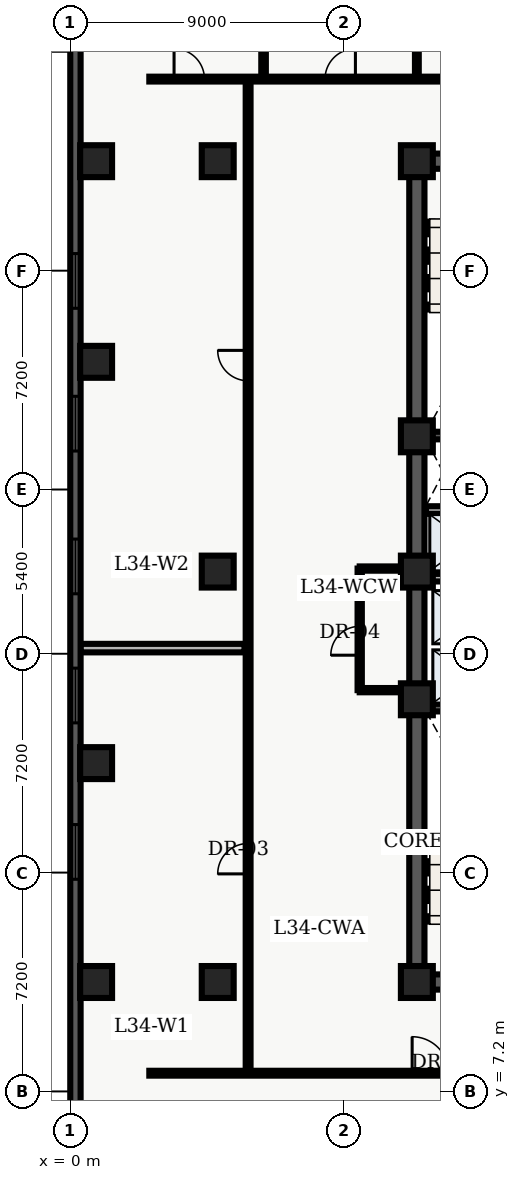
"""IFC4 building model, lengths in metres.
Left out: names, types, materials, properties, quantities, classifications, styles, units other than length and angle.
Written with IfcOpenShell. Run it as: python <this file> out.ifc"""

import sys

from ifc_helpers import new_model, entity, si_unit, converted_unit, direction, frame, origin_with_axes, origin_2d_with_axis, place, context, subcontext, project, spatial, polyline, rectangle, outline, extrude, element, fill, save


model = new_model("IFC4")
c1 = context("Model", 3, precision=1e-05, world=origin_with_axes(), true_north=direction((0.0, 1.0)))
c2 = subcontext(c1, "Body", "Model", "MODEL_VIEW")
j1 = project(units=[si_unit("LENGTHUNIT", "METRE"), converted_unit("PLANEANGLEUNIT", "DEGREE", entity("IfcPlaneAngleMeasure", 0.017), si_unit("PLANEANGLEUNIT", "RADIAN"), dimensions=[0, 0, 0, 0, 0, 0, 0])], contexts=[c1])
p1 = place(None, origin_with_axes())
s1 = spatial("IfcSite", under=j1, at=p1, CompositionType="ELEMENT")
p2 = place(p1, origin_with_axes())
s2 = spatial("IfcBuilding", under=s1, at=p2, CompositionType="ELEMENT")
p3 = place(p2, frame((0.0, 0.0, 140.7), z_axis=(0.0, 0.0, 1.0), x_axis=(1.0, 0.0, 0.0)))
s3 = spatial("IfcBuildingStorey", under=s2, at=p3, CompositionType="ELEMENT", Elevation=140.7)
p4 = place(p3, frame((11.4, 10.8, 0.0), z_axis=(0.0, 0.0, 1.0), x_axis=(0.0, 1.0, 0.0)))
e1 = element("IfcWall", 1, at=p4, inside=s3, PredefinedType="SHEAR", context=c2, shape_type="SweptSolid", body=[
    extrude(outline(polyline([(0.0, -0.25), (27.0, -0.25), (27.0, 0.25), (0.0, 0.25), (0.0, -0.25)])), origin_with_axes(), (0.0, 0.0, 1.0), 3.66),
])
p5 = place(p3, frame((11.4, 10.8, 0.0), z_axis=(0.0, 0.0, 1.0), x_axis=(1.0, 0.0, 0.0)))
e2 = element("IfcWall", 2, at=p5, inside=s3, PredefinedType="SHEAR", context=c2, shape_type="SweptSolid", body=[
    extrude(outline(polyline([(0.0, -0.25), (7.2, -0.25), (7.2, 0.25), (0.0, 0.25), (0.0, -0.25)])), origin_with_axes(), (0.0, 0.0, 1.0), 3.66),
])
p6 = place(p5, frame((2.625, 0.0, 0.0), z_axis=(0.0, 0.0, 1.0), x_axis=(1.0, 0.0, 0.0)))
e3 = element("IfcOpeningElement", 3, at=p6, cuts=e2, PredefinedType="OPENING", context=c2, shape_type="SweptSolid", body=[
    extrude(rectangle(XDim=1.05, YDim=0.52, at=origin_2d_with_axis()), origin_with_axes(), (0.0, 0.0, 1.0), 2.15),
])
p7 = place(p3, frame((11.4, 37.8, 0.0), z_axis=(0.0, 0.0, 1.0), x_axis=(1.0, 0.0, 0.0)))
e4 = element("IfcWall", 4, at=p7, inside=s3, PredefinedType="SHEAR", context=c2, shape_type="SweptSolid", body=[
    extrude(outline(polyline([(0.0, -0.25), (7.2, -0.25), (7.2, 0.25), (0.0, 0.25), (0.0, -0.25)])), origin_with_axes(), (0.0, 0.0, 1.0), 3.66),
])
p8 = place(p7, frame((2.625, 0.0, 0.0), z_axis=(0.0, 0.0, 1.0), x_axis=(1.0, 0.0, 0.0)))
e5 = element("IfcOpeningElement", 5, at=p8, cuts=e4, PredefinedType="OPENING", context=c2, shape_type="SweptSolid", body=[
    extrude(rectangle(XDim=1.05, YDim=0.52, at=origin_2d_with_axis()), origin_with_axes(), (0.0, 0.0, 1.0), 2.15),
])
for number, where, z_axis, x_axis in (
    (6, (11.65, 19.825, 0.0), (0.0, 0.0, 1.0), (1.0, 0.0, 0.0)),
    (7, (11.65, 28.775, 0.0), (0.0, 0.0, 1.0), (1.0, 0.0, 0.0)),
):
    element("IfcWall", number, at=place(p3, frame(where, z_axis=z_axis, x_axis=x_axis)), inside=s3, PredefinedType="SHEAR", context=c2, shape_type="SweptSolid", body=[
        extrude(outline(polyline([(0.0, -0.125), (6.7, -0.125), (6.7, 0.125), (0.0, 0.125), (0.0, -0.125)])), origin_with_axes(), (0.0, 0.0, 1.0), 3.66),
    ])
p9 = place(p3, frame((11.7, 24.1, 0.0), z_axis=(0.0, 0.0, 1.0), x_axis=(1.0, 0.0, 0.0)))
e8 = element("IfcWall", 8, at=p9, inside=s3, PredefinedType="SOLIDWALL", context=c2, shape_type="SweptSolid", body=[
    extrude(outline(polyline([(0.0, -0.125), (6.6, -0.125), (6.6, 0.125), (0.0, 0.125), (0.0, -0.125)])), origin_with_axes(), (0.0, 0.0, 1.0), 2.7),
])
p10 = place(p9, frame((3.6, 0.0, 0.0), z_axis=(0.0, 0.0, 1.0), x_axis=(1.0, 0.0, 0.0)))
e9 = element("IfcOpeningElement", 9, at=p10, cuts=e8, PredefinedType="OPENING", context=c2, shape_type="SweptSolid", body=[
    extrude(rectangle(XDim=0.9, YDim=0.27, at=origin_2d_with_axis()), origin_with_axes(), (0.0, 0.0, 1.0), 2.15),
])
p11 = place(p9, frame((5.65, 0.0, 0.0), z_axis=(0.0, 0.0, 1.0), x_axis=(1.0, 0.0, 0.0)))
e10 = element("IfcOpeningElement", 10, at=p11, cuts=e8, PredefinedType="OPENING", context=c2, shape_type="SweptSolid", body=[
    extrude(rectangle(XDim=0.9, YDim=0.27, at=origin_2d_with_axis()), origin_with_axes(), (0.0, 0.0, 1.0), 2.15),
])
p12 = place(p3, frame((11.7, 26.325, 0.0), z_axis=(0.0, 0.0, 1.0), x_axis=(1.0, 0.0, 0.0)))
e11 = element("IfcWall", 11, at=p12, inside=s3, PredefinedType="SOLIDWALL", context=c2, shape_type="SweptSolid", body=[
    extrude(outline(polyline([(0.0, -0.125), (6.6, -0.125), (6.6, 0.125), (0.0, 0.125), (0.0, -0.125)])), origin_with_axes(), (0.0, 0.0, 1.0), 2.7),
])
p13 = place(p12, frame((3.5, 0.0, 0.0), z_axis=(0.0, 0.0, 1.0), x_axis=(1.0, 0.0, 0.0)))
e12 = element("IfcOpeningElement", 12, at=p13, cuts=e11, PredefinedType="OPENING", context=c2, shape_type="SweptSolid", body=[
    extrude(rectangle(XDim=0.9, YDim=0.27, at=origin_2d_with_axis()), origin_with_axes(), (0.0, 0.0, 1.0), 2.15),
])
for number, where, z_axis, x_axis in (
    (13, (11.4, 10.8, 0.0), (0.0, 0.0, 1.0), (1.0, 0.0, 0.0)),
    (14, (11.4, 20.1, 0.0), (0.0, 0.0, 1.0), (1.0, 0.0, 0.0)),
    (15, (11.4, 24.3, 0.0), (0.0, 0.0, 1.0), (1.0, 0.0, 0.0)),
    (16, (11.4, 28.75, 0.0), (0.0, 0.0, 1.0), (1.0, 0.0, 0.0)),
    (17, (11.4, 37.8, 0.0), (0.0, 0.0, 1.0), (1.0, 0.0, 0.0)),
    (18, (4.85, 10.8, 0.0), (0.0, 0.0, 1.0), (1.0, 0.0, 0.0)),
    (19, (4.85, 24.3, 0.0), (0.0, 0.0, 1.0), (1.0, 0.0, 0.0)),
    (20, (4.85, 37.8, 0.0), (0.0, 0.0, 1.0), (1.0, 0.0, 0.0)),
    (21, (0.85, 10.8, 0.0), (0.0, 0.0, 1.0), (1.0, 0.0, 0.0)),
    (22, (0.85, 18.0, 0.0), (0.0, 0.0, 1.0), (1.0, 0.0, 0.0)),
    (23, (0.85, 31.2, 0.0), (0.0, 0.0, 1.0), (1.0, 0.0, 0.0)),
    (24, (0.85, 37.8, 0.0), (0.0, 0.0, 1.0), (1.0, 0.0, 0.0)),
):
    element("IfcColumn", number, at=place(p3, frame(where, z_axis=z_axis, x_axis=x_axis)), inside=s3, PredefinedType="COLUMN", context=c2, shape_type="SweptSolid", body=[
        extrude(rectangle(XDim=1.05, YDim=1.05, at=origin_2d_with_axis()), origin_with_axes(), (0.0, 0.0, 1.0), 3.9),
    ])
p14 = place(p3, frame((9.52, 20.4, 0.0), z_axis=(0.0, 0.0, 1.0), x_axis=(0.0, 1.0, 0.0)))
e25 = element("IfcWall", 25, at=p14, inside=s3, PredefinedType="PARTITIONING", context=c2, shape_type="SweptSolid", body=[
    extrude(outline(polyline([(0.0, -0.07), (4.0, -0.07), (4.0, 0.07), (0.0, 0.07), (0.0, -0.07)])), origin_with_axes(), (0.0, 0.0, 1.0), 2.7),
])
p15 = place(p14, frame((1.625, 0.0, 0.0), z_axis=(0.0, 0.0, 1.0), x_axis=(1.0, 0.0, 0.0)))
e26 = element("IfcOpeningElement", 26, at=p15, cuts=e25, PredefinedType="OPENING", context=c2, shape_type="SweptSolid", body=[
    extrude(rectangle(XDim=0.95, YDim=0.16, at=origin_2d_with_axis()), origin_with_axes(), (0.0, 0.0, 1.0), 2.15),
])
for number, where, z_axis, x_axis in (
    (27, (9.52, 20.4, 0.0), (0.0, 0.0, 1.0), (1.0, 0.0, 0.0)),
    (28, (9.52, 24.4, 0.0), (0.0, 0.0, 1.0), (1.0, 0.0, 0.0)),
):
    element("IfcWall", number, at=place(p3, frame(where, z_axis=z_axis, x_axis=x_axis)), inside=s3, PredefinedType="PARTITIONING", context=c2, shape_type="SweptSolid", body=[
        extrude(outline(polyline([(0.0, -0.07), (1.58, -0.07), (1.58, 0.07), (0.0, 0.07), (0.0, -0.07)])), origin_with_axes(), (0.0, 0.0, 1.0), 2.7),
    ])
p16 = place(p3, frame((2.6, 7.8, 0.0), z_axis=(0.0, 0.0, 1.0), x_axis=(1.0, 0.0, 0.0)))
e29 = element("IfcWall", 29, at=p16, inside=s3, PredefinedType="PARTITIONING", context=c2, shape_type="SweptSolid", body=[
    extrude(outline(polyline([(0.0, -0.08), (18.55, -0.08), (18.55, 0.08), (0.0, 0.08), (0.0, -0.08)])), origin_with_axes(), (0.0, 0.0, 1.0), 2.7),
])
p17 = place(p16, frame((9.245, 0.0, 0.0), z_axis=(0.0, 0.0, 1.0), x_axis=(1.0, 0.0, 0.0)))
e30 = element("IfcOpeningElement", 30, at=p17, cuts=e29, PredefinedType="OPENING", context=c2, shape_type="SweptSolid", body=[
    extrude(rectangle(XDim=1.2, YDim=0.18, at=origin_2d_with_axis()), origin_with_axes(), (0.0, 0.0, 1.0), 2.2),
])
p18 = place(p3, frame((2.6, 40.5, 0.0), z_axis=(0.0, 0.0, 1.0), x_axis=(1.0, 0.0, 0.0)))
e31 = element("IfcWall", 31, at=p18, inside=s3, PredefinedType="PARTITIONING", context=c2, shape_type="SweptSolid", body=[
    extrude(outline(polyline([(0.0, -0.08), (19.054, -0.08), (19.054, 0.08), (0.0, 0.08), (0.0, -0.08)])), origin_with_axes(), (0.0, 0.0, 1.0), 2.7),
])
p19 = place(p18, frame((1.314, 0.0, 0.0), z_axis=(0.0, 0.0, 1.0), x_axis=(1.0, 0.0, 0.0)))
e32 = element("IfcOpeningElement", 32, at=p19, cuts=e31, PredefinedType="OPENING", context=c2, shape_type="SweptSolid", body=[
    extrude(rectangle(XDim=1.0, YDim=0.18, at=origin_2d_with_axis()), origin_with_axes(), (0.0, 0.0, 1.0), 2.15),
])
p20 = place(p18, frame((6.279, 0.0, 0.0), z_axis=(0.0, 0.0, 1.0), x_axis=(1.0, 0.0, 0.0)))
e33 = element("IfcOpeningElement", 33, at=p20, cuts=e31, PredefinedType="OPENING", context=c2, shape_type="SweptSolid", body=[
    extrude(rectangle(XDim=1.0, YDim=0.18, at=origin_2d_with_axis()), origin_with_axes(), (0.0, 0.0, 1.0), 2.15),
])
p21 = place(p18, frame((10.768, 0.0, 0.0), z_axis=(0.0, 0.0, 1.0), x_axis=(1.0, 0.0, 0.0)))
e34 = element("IfcOpeningElement", 34, at=p21, cuts=e31, PredefinedType="OPENING", context=c2, shape_type="SweptSolid", body=[
    extrude(rectangle(XDim=1.0, YDim=0.18, at=origin_2d_with_axis()), origin_with_axes(), (0.0, 0.0, 1.0), 2.15),
])
p22 = place(p18, frame((14.298, 0.0, 0.0), z_axis=(0.0, 0.0, 1.0), x_axis=(1.0, 0.0, 0.0)))
e35 = element("IfcOpeningElement", 35, at=p22, cuts=e31, PredefinedType="OPENING", context=c2, shape_type="SweptSolid", body=[
    extrude(rectangle(XDim=1.0, YDim=0.18, at=origin_2d_with_axis()), origin_with_axes(), (0.0, 0.0, 1.0), 2.15),
])
p23 = place(p3, frame((5.85, 7.8, 0.0), z_axis=(0.0, 0.0, 1.0), x_axis=(0.0, 1.0, 0.0)))
e36 = element("IfcWall", 36, at=p23, inside=s3, PredefinedType="PARTITIONING", context=c2, shape_type="SweptSolid", body=[
    extrude(outline(polyline([(0.0, -0.08), (32.7, -0.08), (32.7, 0.08), (0.0, 0.08), (0.0, -0.08)])), origin_with_axes(), (0.0, 0.0, 1.0), 2.7),
])
p24 = place(p23, frame((7.056, 0.0, 0.0), z_axis=(0.0, 0.0, 1.0), x_axis=(1.0, 0.0, 0.0)))
e37 = element("IfcOpeningElement", 37, at=p24, cuts=e36, PredefinedType="OPENING", context=c2, shape_type="SweptSolid", body=[
    extrude(rectangle(XDim=1.0, YDim=0.18, at=origin_2d_with_axis()), origin_with_axes(), (0.0, 0.0, 1.0), 2.15),
])
p25 = place(p23, frame((23.276, 0.0, 0.0), z_axis=(0.0, 0.0, 1.0), x_axis=(1.0, 0.0, 0.0)))
e38 = element("IfcOpeningElement", 38, at=p25, cuts=e36, PredefinedType="OPENING", context=c2, shape_type="SweptSolid", body=[
    extrude(rectangle(XDim=1.0, YDim=0.18, at=origin_2d_with_axis()), origin_with_axes(), (0.0, 0.0, 1.0), 2.15),
])
p26 = place(p3, frame((0.335, 21.783, 0.0), z_axis=(0.0, 0.0, 1.0), x_axis=(1.0, 0.0, 0.0)))
e39 = element("IfcWall", 39, at=p26, inside=s3, PredefinedType="PARTITIONING", context=c2, shape_type="SweptSolid", body=[
    extrude(outline(polyline([(0.0, -0.14), (5.395, -0.14), (5.395, 0.14), (0.0, 0.14), (0.0, -0.14)])), origin_with_axes(), (0.0, 0.0, 1.0), 2.7),
])
p27 = place(p3, frame((6.358, 40.6, 0.0), z_axis=(0.0, 0.0, 1.0), x_axis=(0.0, 1.0, 0.0)))
e40 = element("IfcWall", 40, at=p27, inside=s3, PredefinedType="PARTITIONING", context=c2, shape_type="SweptSolid", body=[
    extrude(outline(polyline([(0.0, -0.075), (7.665, -0.075), (7.665, 0.075), (0.0, 0.075), (0.0, -0.075)])), origin_with_axes(), (0.0, 0.0, 1.0), 2.7),
])
p28 = place(p3, frame((11.4, 40.6, 0.0), z_axis=(0.0, 0.0, 1.0), x_axis=(0.0, 1.0, 0.0)))
e41 = element("IfcWall", 41, at=p28, inside=s3, PredefinedType="PARTITIONING", context=c2, shape_type="SweptSolid", body=[
    extrude(outline(polyline([(0.0, -0.062), (7.665, -0.062), (7.665, 0.062), (0.0, 0.062), (0.0, -0.062)])), origin_with_axes(), (0.0, 0.0, 1.0), 2.7),
])
p29 = place(p3, frame((0.17, 2.74, 0.0), z_axis=(0.0, 0.0, 1.0), x_axis=(0.0, 1.0, 0.0)))
e42 = element("IfcWall", 42, at=p29, inside=s3, PredefinedType="SOLIDWALL", context=c2, shape_type="SweptSolid", body=[
    extrude(outline(polyline([(0.0, -0.17), (43.46, -0.17), (43.46, 0.17), (0.0, 0.17), (0.0, -0.17)])), origin_with_axes(), (0.0, 0.0, 1.0), 3.66),
])
p30 = place(p29, frame((2.948, 0.0, 0.45), z_axis=(0.0, 0.0, 1.0), x_axis=(1.0, 0.0, 0.0)))
e43 = element("IfcOpeningElement", 43, at=p30, cuts=e42, PredefinedType="OPENING", context=c2, shape_type="SweptSolid", body=[
    extrude(rectangle(XDim=1.8, YDim=0.36, at=origin_2d_with_axis()), origin_with_axes(), (0.0, 0.0, 1.0), 2.1),
])
p31 = place(p29, frame((12.339, 0.0, 0.45), z_axis=(0.0, 0.0, 1.0), x_axis=(1.0, 0.0, 0.0)))
e44 = element("IfcOpeningElement", 44, at=p31, cuts=e42, PredefinedType="OPENING", context=c2, shape_type="SweptSolid", body=[
    extrude(rectangle(XDim=1.8, YDim=0.36, at=origin_2d_with_axis()), origin_with_axes(), (0.0, 0.0, 1.0), 2.1),
])
p32 = place(p29, frame((17.484, 0.0, 0.45), z_axis=(0.0, 0.0, 1.0), x_axis=(1.0, 0.0, 0.0)))
e45 = element("IfcOpeningElement", 45, at=p32, cuts=e42, PredefinedType="OPENING", context=c2, shape_type="SweptSolid", body=[
    extrude(rectangle(XDim=1.8, YDim=0.36, at=origin_2d_with_axis()), origin_with_axes(), (0.0, 0.0, 1.0), 2.1),
])
p33 = place(p29, frame((21.73, 0.0, 0.45), z_axis=(0.0, 0.0, 1.0), x_axis=(1.0, 0.0, 0.0)))
e46 = element("IfcOpeningElement", 46, at=p33, cuts=e42, PredefinedType="OPENING", context=c2, shape_type="SweptSolid", body=[
    extrude(rectangle(XDim=1.8, YDim=0.36, at=origin_2d_with_axis()), origin_with_axes(), (0.0, 0.0, 1.0), 2.1),
])
p34 = place(p29, frame((26.426, 0.0, 0.45), z_axis=(0.0, 0.0, 1.0), x_axis=(1.0, 0.0, 0.0)))
e47 = element("IfcOpeningElement", 47, at=p34, cuts=e42, PredefinedType="OPENING", context=c2, shape_type="SweptSolid", body=[
    extrude(rectangle(XDim=1.8, YDim=0.36, at=origin_2d_with_axis()), origin_with_axes(), (0.0, 0.0, 1.0), 2.1),
])
p35 = place(p29, frame((31.121, 0.0, 0.45), z_axis=(0.0, 0.0, 1.0), x_axis=(1.0, 0.0, 0.0)))
e48 = element("IfcOpeningElement", 48, at=p35, cuts=e42, PredefinedType="OPENING", context=c2, shape_type="SweptSolid", body=[
    extrude(rectangle(XDim=1.8, YDim=0.36, at=origin_2d_with_axis()), origin_with_axes(), (0.0, 0.0, 1.0), 2.1),
])
p36 = place(p29, frame((40.062, 0.0, 0.45), z_axis=(0.0, 0.0, 1.0), x_axis=(1.0, 0.0, 0.0)))
e49 = element("IfcOpeningElement", 49, at=p36, cuts=e42, PredefinedType="OPENING", context=c2, shape_type="SweptSolid", body=[
    extrude(rectangle(XDim=1.8, YDim=0.36, at=origin_2d_with_axis()), origin_with_axes(), (0.0, 0.0, 1.0), 2.1),
])
p37 = place(p14, frame((1.625, 0.0, 0.0), z_axis=(0.0, 0.0, 1.0), x_axis=(1.0, 0.0, 0.0)))
e50 = element("IfcDoor", 50, at=p37, inside=s3, OperationType="SINGLE_SWING_LEFT", PredefinedType="DOOR", context=c2, shape_type="SweptSolid", body=[
    extrude(rectangle(XDim=0.95, YDim=0.084, at=origin_2d_with_axis()), origin_with_axes(), (0.0, 0.0, 1.0), 2.15),
])
fill(e26, e50)
p38 = place(p23, frame((7.056, 0.0, 0.0), z_axis=(0.0, 0.0, 1.0), x_axis=(1.0, 0.0, 0.0)))
e51 = element("IfcDoor", 51, at=p38, inside=s3, OperationType="SINGLE_SWING_LEFT", PredefinedType="DOOR", context=c2, shape_type="SweptSolid", body=[
    extrude(rectangle(XDim=1.0, YDim=0.09, at=origin_2d_with_axis()), origin_with_axes(), (0.0, 0.0, 1.0), 2.15),
])
fill(e37, e51)
p39 = place(p23, frame((23.276, 0.0, 0.0), z_axis=(0.0, 0.0, 1.0), x_axis=(1.0, 0.0, 0.0)))
e52 = element("IfcDoor", 52, at=p39, inside=s3, OperationType="SINGLE_SWING_RIGHT", PredefinedType="DOOR", context=c2, shape_type="SweptSolid", body=[
    extrude(rectangle(XDim=1.0, YDim=0.09, at=origin_2d_with_axis()), origin_with_axes(), (0.0, 0.0, 1.0), 2.15),
])
fill(e38, e52)
p40 = place(p16, frame((9.245, 0.0, 0.0), z_axis=(0.0, 0.0, 1.0), x_axis=(1.0, 0.0, 0.0)))
e53 = element("IfcDoor", 53, at=p40, inside=s3, OperationType="SINGLE_SWING_LEFT", PredefinedType="DOOR", context=c2, shape_type="SweptSolid", body=[
    extrude(rectangle(XDim=1.2, YDim=0.09, at=origin_2d_with_axis()), origin_with_axes(), (0.0, 0.0, 1.0), 2.2),
])
fill(e30, e53)
p41 = place(p18, frame((1.314, 0.0, 0.0), z_axis=(0.0, 0.0, 1.0), x_axis=(1.0, 0.0, 0.0)))
e54 = element("IfcDoor", 54, at=p41, inside=s3, OperationType="SINGLE_SWING_LEFT", PredefinedType="DOOR", context=c2, shape_type="SweptSolid", body=[
    extrude(rectangle(XDim=1.0, YDim=0.09, at=origin_2d_with_axis()), origin_with_axes(), (0.0, 0.0, 1.0), 2.15),
])
fill(e32, e54)
p42 = place(p18, frame((6.279, 0.0, 0.0), z_axis=(0.0, 0.0, 1.0), x_axis=(1.0, 0.0, 0.0)))
e55 = element("IfcDoor", 55, at=p42, inside=s3, OperationType="SINGLE_SWING_RIGHT", PredefinedType="DOOR", context=c2, shape_type="SweptSolid", body=[
    extrude(rectangle(XDim=1.0, YDim=0.09, at=origin_2d_with_axis()), origin_with_axes(), (0.0, 0.0, 1.0), 2.15),
])
fill(e33, e55)
p43 = place(p29, frame((12.339, 0.0, 0.45), z_axis=(0.0, 0.0, 1.0), x_axis=(1.0, 0.0, 0.0)))
e56 = element("IfcWindow", 56, at=p43, inside=s3, PredefinedType="WINDOW", context=c2, shape_type="SweptSolid", body=[
    extrude(rectangle(XDim=1.8, YDim=0.09, at=origin_2d_with_axis()), origin_with_axes(), (0.0, 0.0, 1.0), 2.1),
])
fill(e44, e56)
p44 = place(p29, frame((17.484, 0.0, 0.45), z_axis=(0.0, 0.0, 1.0), x_axis=(1.0, 0.0, 0.0)))
e57 = element("IfcWindow", 57, at=p44, inside=s3, PredefinedType="WINDOW", context=c2, shape_type="SweptSolid", body=[
    extrude(rectangle(XDim=1.8, YDim=0.09, at=origin_2d_with_axis()), origin_with_axes(), (0.0, 0.0, 1.0), 2.1),
])
fill(e45, e57)
p45 = place(p29, frame((21.73, 0.0, 0.45), z_axis=(0.0, 0.0, 1.0), x_axis=(1.0, 0.0, 0.0)))
e58 = element("IfcWindow", 58, at=p45, inside=s3, PredefinedType="WINDOW", context=c2, shape_type="SweptSolid", body=[
    extrude(rectangle(XDim=1.8, YDim=0.09, at=origin_2d_with_axis()), origin_with_axes(), (0.0, 0.0, 1.0), 2.1),
])
fill(e46, e58)
p46 = place(p29, frame((26.426, 0.0, 0.45), z_axis=(0.0, 0.0, 1.0), x_axis=(1.0, 0.0, 0.0)))
e59 = element("IfcWindow", 59, at=p46, inside=s3, PredefinedType="WINDOW", context=c2, shape_type="SweptSolid", body=[
    extrude(rectangle(XDim=1.8, YDim=0.09, at=origin_2d_with_axis()), origin_with_axes(), (0.0, 0.0, 1.0), 2.1),
])
fill(e47, e59)
p47 = place(p29, frame((31.121, 0.0, 0.45), z_axis=(0.0, 0.0, 1.0), x_axis=(1.0, 0.0, 0.0)))
e60 = element("IfcWindow", 60, at=p47, inside=s3, PredefinedType="WINDOW", context=c2, shape_type="SweptSolid", body=[
    extrude(rectangle(XDim=1.8, YDim=0.09, at=origin_2d_with_axis()), origin_with_axes(), (0.0, 0.0, 1.0), 2.1),
])
fill(e48, e60)
save(model, sys.argv[1])
